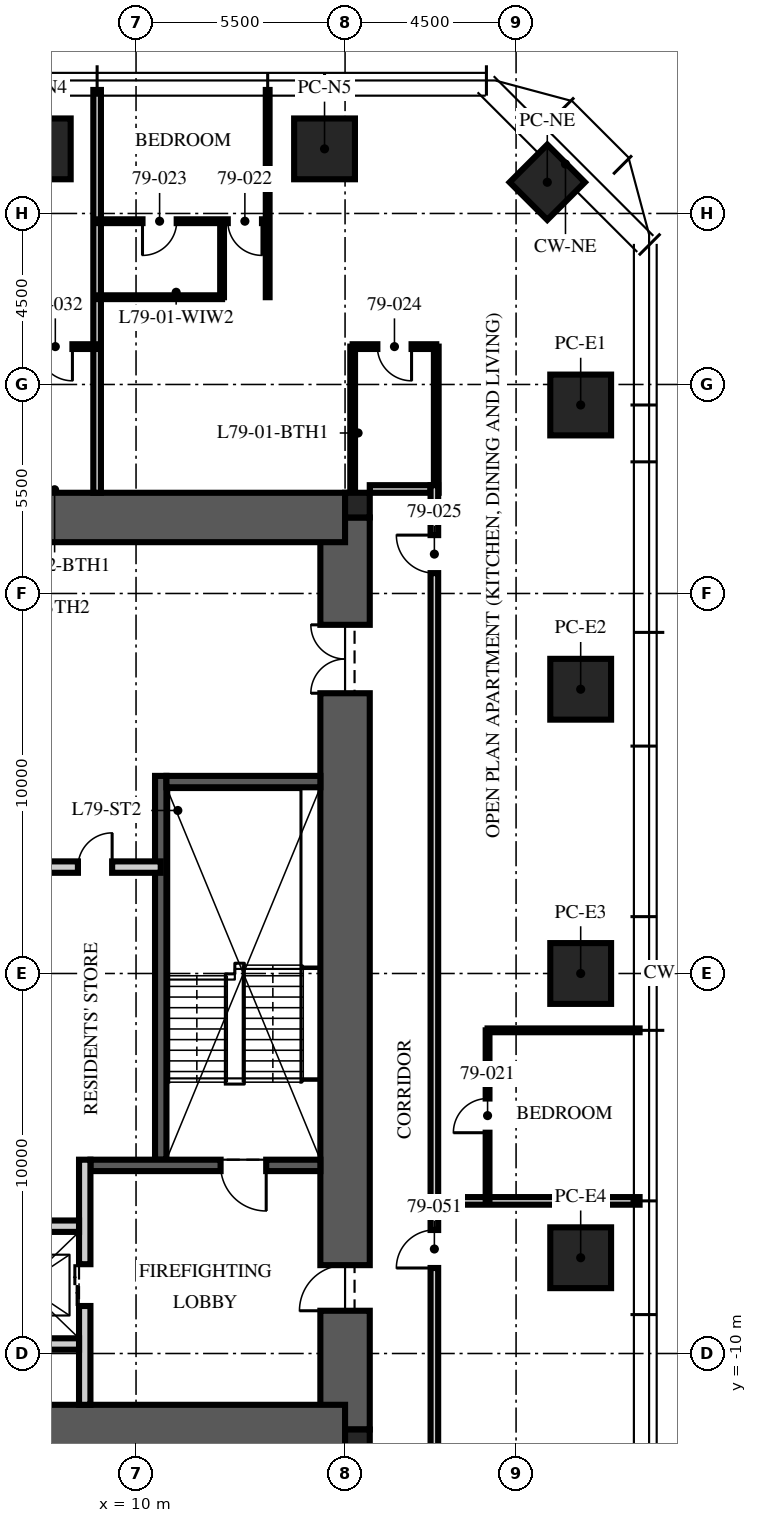
"""IFC4 building model, lengths in metres.
Left out: names, types, materials, properties, quantities, classifications, styles, units other than length and angle.
Written with IfcOpenShell. Run it as: python <this file> out.ifc"""

import sys

from ifc_helpers import new_model, si_unit, direction, frame, frame_2d, origin, origin_2d, place, context, subcontext, project, spatial, rectangle, extrude, element, fill, save


model = new_model("IFC4")
c1 = context("Model", 3, precision=1e-05, world=origin(), true_north=direction((0.0, 1.0)))
c2 = subcontext(c1, "Body", "Model", "MODEL_VIEW")
j1 = project(units=[si_unit("LENGTHUNIT", "METRE"), si_unit("PLANEANGLEUNIT", "RADIAN")], contexts=[c1])
p1 = place(None, origin())
s1 = spatial("IfcSite", under=j1, at=p1, CompositionType="ELEMENT")
p2 = place(p1, origin())
s2 = spatial("IfcBuilding", under=s1, at=p2, CompositionType="ELEMENT")
p3 = place(p2, frame((0.0, 0.0, 315.75)))
s3 = spatial("IfcBuildingStorey", under=s2, at=p3, CompositionType="ELEMENT", Elevation=315.75)
p4 = place(p3, frame((15.5, -12.0, -0.25), z_axis=(0.0, 0.0, 1.0), x_axis=(0.0, 1.0, 0.0)))
e1 = element("IfcWall", 1, at=p4, inside=s3, PredefinedType="SHEAR", context=c2, shape_type="SweptSolid", body=[
    extrude(rectangle(XDim=24.0, YDim=1.3, at=frame_2d((12.0, 0.0))), origin(), (0.0, 0.0, 1.0), 3.75),
])
p5 = place(p4, frame((3.125, 0.0, 0.25)))
e2 = element("IfcOpeningElement", 2, at=p5, cuts=e1, PredefinedType="OPENING", context=c2, shape_type="SweptSolid", body=[
    extrude(rectangle(XDim=1.2, YDim=2.1, at=frame_2d((0.6, 1.05))), frame((0.0, 0.66, 0.0), z_axis=(0.0, -1.0, 0.0), x_axis=(1.0, 0.0, 0.0)), (0.0, 0.0, 1.0), 1.32),
])
p6 = place(p4, frame((19.375, 0.0, 0.25)))
e3 = element("IfcOpeningElement", 3, at=p6, cuts=e1, PredefinedType="OPENING", context=c2, shape_type="SweptSolid", body=[
    extrude(rectangle(XDim=1.8, YDim=2.1, at=frame_2d((0.9, 1.05))), frame((0.0, 0.66, 0.0), z_axis=(0.0, -1.0, 0.0), x_axis=(1.0, 0.0, 0.0)), (0.0, 0.0, 1.0), 1.32),
])
for number, where, z_axis, x_axis in (
    (4, (-15.5, 12.0, -0.25), (0.0, 0.0, 1.0), (1.0, 0.0, 0.0)),
    (5, (-15.5, -12.0, -0.25), (0.0, 0.0, 1.0), (1.0, 0.0, 0.0)),
):
    element("IfcWall", number, at=place(p3, frame(where, z_axis=z_axis, x_axis=x_axis)), inside=s3, PredefinedType="SHEAR", context=c2, shape_type="SweptSolid", body=[
        extrude(rectangle(XDim=31.0, YDim=1.3, at=frame_2d((15.5, 0.0))), origin(), (0.0, 0.0, 1.0), 3.75),
    ])
for number, where, z_axis, x_axis in (
    (6, (15.825, 12.325, -0.25), (0.0, 0.0, 1.0), (1.0, 0.0, 0.0)),
    (7, (15.825, -12.325, -0.25), (0.0, 0.0, 1.0), (1.0, 0.0, 0.0)),
):
    element("IfcColumn", number, at=place(p3, frame(where, z_axis=z_axis, x_axis=x_axis)), inside=s3, PredefinedType="COLUMN", context=c2, shape_type="SweptSolid", body=[
        extrude(rectangle(XDim=0.65, YDim=0.65, at=origin_2d()), origin(), (0.0, 0.0, 1.0), 3.75),
    ])
for number, where, z_axis, x_axis in (
    (8, (7.48, 21.7, 0.0), (0.0, 0.0, 1.0), (1.0, 0.0, 0.0)),
    (9, (14.96, 21.7, 0.0), (0.0, 0.0, 1.0), (1.0, 0.0, 0.0)),
    (10, (21.7, 14.96, 0.0), (0.0, 0.0, 1.0), (0.0, 1.0, 0.0)),
    (11, (21.7, 7.48, 0.0), (0.0, 0.0, 1.0), (0.0, 1.0, 0.0)),
    (12, (21.7, 0.0, 0.0), (0.0, 0.0, 1.0), (0.0, 1.0, 0.0)),
    (13, (21.7, -7.48, 0.0), (0.0, 0.0, 1.0), (0.0, 1.0, 0.0)),
):
    element("IfcColumn", number, at=place(p3, frame(where, z_axis=z_axis, x_axis=x_axis)), inside=s3, PredefinedType="COLUMN", context=c2, shape_type="SweptSolid", body=[
        extrude(rectangle(XDim=1.6, YDim=1.6, at=origin_2d()), origin(), (0.0, 0.0, 1.0), 3.75),
    ])
p7 = place(p3, frame((20.821, 20.821, 0.0), z_axis=(0.0, 0.0, 1.0), x_axis=(0.707106781187, -0.707106781187, 0.0)))
e14 = element("IfcColumn", 14, at=p7, inside=s3, PredefinedType="COLUMN", context=c2, shape_type="SweptSolid", body=[
    extrude(rectangle(XDim=1.4, YDim=1.4, at=origin_2d()), origin(), (0.0, 0.0, 1.0), 3.75),
])
p8 = place(p3, frame((10.65, -4.9, 0.0), z_axis=(0.0, 0.0, 1.0), x_axis=(0.0, 1.0, 0.0)))
e15 = element("IfcWall", 15, at=p8, inside=s3, PredefinedType="SOLIDWALL", context=c2, shape_type="SweptSolid", body=[
    extrude(rectangle(XDim=10.1, YDim=0.3, at=frame_2d((5.05, 0.0))), origin(), (0.0, 0.0, 1.0), 3.5),
])
p9 = place(p3, frame((14.85, -5.05, 0.0), z_axis=(0.0, 0.0, 1.0), x_axis=(-1.0, 0.0, 0.0)))
e16 = element("IfcWall", 16, at=p9, inside=s3, PredefinedType="SOLIDWALL", context=c2, shape_type="SweptSolid", body=[
    extrude(rectangle(XDim=6.05, YDim=0.3, at=frame_2d((3.025, 0.0))), origin(), (0.0, 0.0, 1.0), 3.5),
])
p10 = place(p9, frame((1.425, 0.0, 0.0)))
e17 = element("IfcOpeningElement", 17, at=p10, cuts=e16, PredefinedType="OPENING", context=c2, shape_type="SweptSolid", body=[
    extrude(rectangle(XDim=1.2, YDim=2.1, at=frame_2d((0.6, 1.05))), frame((0.0, 0.16, 0.0), z_axis=(0.0, -1.0, 0.0), x_axis=(1.0, 0.0, 0.0)), (0.0, 0.0, 1.0), 0.32),
])
p11 = place(p3, frame((14.85, 5.05, 0.0), z_axis=(0.0, 0.0, 1.0), x_axis=(-1.0, 0.0, 0.0)))
e18 = element("IfcWall", 18, at=p11, inside=s3, PredefinedType="SOLIDWALL", context=c2, shape_type="SweptSolid", body=[
    extrude(rectangle(XDim=4.05, YDim=0.3, at=frame_2d((2.025, 0.0))), origin(), (0.0, 0.0, 1.0), 3.5),
])
p12 = place(p3, frame((8.65, -11.35, 0.0), z_axis=(0.0, 0.0, 1.0), x_axis=(0.0, 1.0, 0.0)))
e19 = element("IfcWall", 19, at=p12, inside=s3, PredefinedType="PARTITIONING", context=c2, shape_type="SweptSolid", body=[
    extrude(rectangle(XDim=6.45, YDim=0.3, at=frame_2d((3.225, 0.0))), origin(), (0.0, 0.0, 1.0), 3.5),
])
p13 = place(p12, frame((2.6, 0.0, 0.0)))
e20 = element("IfcOpeningElement", 20, at=p13, cuts=e19, PredefinedType="OPENING", context=c2, shape_type="SweptSolid", body=[
    extrude(rectangle(XDim=1.1, YDim=2.1, at=frame_2d((0.55, 1.05))), frame((0.0, 0.16, 0.0), z_axis=(0.0, -1.0, 0.0), x_axis=(1.0, 0.0, 0.0)), (0.0, 0.0, 1.0), 0.32),
])
p14 = place(p3, frame((-8.5, -6.65, 0.0), z_axis=(0.0, 0.0, 1.0), x_axis=(1.0, 0.0, 0.0)))
e21 = element("IfcWall", 21, at=p14, inside=s3, PredefinedType="PARTITIONING", context=c2, shape_type="SweptSolid", body=[
    extrude(rectangle(XDim=17.0, YDim=0.3, at=frame_2d((8.5, 0.0))), origin(), (0.0, 0.0, 1.0), 3.5),
])
p15 = place(p14, frame((7.8, 0.0, 0.0)))
e22 = element("IfcOpeningElement", 22, at=p15, cuts=e21, PredefinedType="OPENING", context=c2, shape_type="SweptSolid", body=[
    extrude(rectangle(XDim=1.3, YDim=2.4, at=frame_2d((0.65, 1.2))), frame((0.0, 0.16, 0.0), z_axis=(0.0, -1.0, 0.0), x_axis=(1.0, 0.0, 0.0)), (0.0, 0.0, 1.0), 0.32),
])
p16 = place(p14, frame((5.65, 0.0, 0.0)))
e23 = element("IfcOpeningElement", 23, at=p16, cuts=e21, PredefinedType="OPENING", context=c2, shape_type="SweptSolid", body=[
    extrude(rectangle(XDim=0.9, YDim=2.1, at=frame_2d((0.45, 1.05))), frame((0.0, 0.16, 0.0), z_axis=(0.0, -1.0, 0.0), x_axis=(1.0, 0.0, 0.0)), (0.0, 0.0, 1.0), 0.32),
])
p17 = place(p14, frame((10.4, 0.0, 0.0)))
e24 = element("IfcOpeningElement", 24, at=p17, cuts=e21, PredefinedType="OPENING", context=c2, shape_type="SweptSolid", body=[
    extrude(rectangle(XDim=0.9, YDim=2.1, at=frame_2d((0.45, 1.05))), frame((0.0, 0.16, 0.0), z_axis=(0.0, -1.0, 0.0), x_axis=(1.0, 0.0, 0.0)), (0.0, 0.0, 1.0), 0.32),
])
p18 = place(p3, frame((5.6, -9.75, 0.0), z_axis=(0.0, 0.0, 1.0), x_axis=(1.0, 0.0, 0.0)))
e25 = element("IfcWall", 25, at=p18, inside=s3, PredefinedType="PARTITIONING", context=c2, shape_type="SweptSolid", body=[
    extrude(rectangle(XDim=2.9, YDim=0.3, at=frame_2d((1.45, 0.0))), origin(), (0.0, 0.0, 1.0), 3.5),
])
p19 = place(p3, frame((-10.65, 2.8, 0.0), z_axis=(0.0, 0.0, 1.0), x_axis=(1.0, 0.0, 0.0)))
e26 = element("IfcWall", 26, at=p19, inside=s3, PredefinedType="PARTITIONING", context=c2, shape_type="SweptSolid", body=[
    extrude(rectangle(XDim=21.3, YDim=0.3, at=frame_2d((10.65, 0.0))), origin(), (0.0, 0.0, 1.0), 3.5),
])
p20 = place(p19, frame((10.05, 0.0, 0.0)))
e27 = element("IfcOpeningElement", 27, at=p20, cuts=e26, PredefinedType="OPENING", context=c2, shape_type="SweptSolid", body=[
    extrude(rectangle(XDim=1.2, YDim=2.1, at=frame_2d((0.6, 1.05))), frame((0.0, 0.16, 0.0), z_axis=(0.0, -1.0, 0.0), x_axis=(1.0, 0.0, 0.0)), (0.0, 0.0, 1.0), 0.32),
])
p21 = place(p19, frame((19.121, 0.0, 0.0)))
e28 = element("IfcOpeningElement", 28, at=p21, cuts=e26, PredefinedType="OPENING", context=c2, shape_type="SweptSolid", body=[
    extrude(rectangle(XDim=0.9, YDim=2.1, at=frame_2d((0.45, 1.05))), frame((0.0, 0.16, 0.0), z_axis=(0.0, -1.0, 0.0), x_axis=(1.0, 0.0, 0.0)), (0.0, 0.0, 1.0), 0.32),
])
p22 = place(p3, frame((16.15, 12.75, 0.0), z_axis=(0.0, 0.0, 1.0), x_axis=(1.0, 0.0, 0.0)))
e29 = element("IfcWall", 29, at=p22, inside=s3, PredefinedType="PARTITIONING", context=c2, shape_type="SweptSolid", body=[
    extrude(rectangle(XDim=1.6, YDim=0.2, at=frame_2d((0.8, 0.0))), origin(), (0.0, 0.0, 1.0), 2.6),
])
p23 = place(p3, frame((17.95, -5.984, 0.0), z_axis=(0.0, 0.0, 1.0), x_axis=(1.0, 0.0, 0.0)))
e30 = element("IfcWall", 30, at=p23, inside=s3, PredefinedType="PARTITIONING", context=c2, shape_type="SweptSolid", body=[
    extrude(rectangle(XDim=5.3, YDim=0.2, at=frame_2d((2.65, 0.0))), origin(), (0.0, 0.0, 1.0), 3.01),
])
p24 = place(p3, frame((19.25, -1.496, 0.0), z_axis=(0.0, 0.0, 1.0), x_axis=(1.0, 0.0, 0.0)))
e31 = element("IfcWall", 31, at=p24, inside=s3, PredefinedType="PARTITIONING", context=c2, shape_type="SweptSolid", body=[
    extrude(rectangle(XDim=4.0, YDim=0.1, at=frame_2d((2.0, 0.0))), origin(), (0.0, 0.0, 1.0), 3.01),
])
p25 = place(p3, frame((13.464, 17.796, 0.0), z_axis=(0.0, 0.0, 1.0), x_axis=(0.0, 1.0, 0.0)))
e32 = element("IfcWall", 32, at=p25, inside=s3, PredefinedType="PARTITIONING", context=c2, shape_type="SweptSolid", body=[
    extrude(rectangle(XDim=5.454, YDim=0.1, at=frame_2d((2.727, 0.0))), origin(), (0.0, 0.0, 1.0), 3.01),
])
p26 = place(p3, frame((8.976, 12.65, 0.0), z_axis=(0.0, 0.0, 1.0), x_axis=(0.0, 1.0, 0.0)))
e33 = element("IfcWall", 33, at=p26, inside=s3, PredefinedType="PARTITIONING", context=c2, shape_type="SweptSolid", body=[
    extrude(rectangle(XDim=10.6, YDim=0.2, at=frame_2d((5.3, 0.0))), origin(), (0.0, 0.0, 1.0), 3.01),
])
p27 = place(p3, frame((19.25, -5.984, 0.0), z_axis=(0.0, 0.0, 1.0), x_axis=(0.0, 1.0, 0.0)))
e34 = element("IfcWall", 34, at=p27, inside=s3, PredefinedType="PARTITIONING", context=c2, shape_type="SweptSolid", body=[
    extrude(rectangle(XDim=4.488, YDim=0.1, at=frame_2d((2.244, 0.0))), origin(), (0.0, 0.0, 1.0), 2.91),
])
p28 = place(p27, frame((1.794, 0.0, 0.0)))
e35 = element("IfcOpeningElement", 35, at=p28, cuts=e34, PredefinedType="OPENING", context=c2, shape_type="SweptSolid", body=[
    extrude(rectangle(XDim=0.9, YDim=2.1, at=frame_2d((0.45, 1.05))), frame((0.0, 0.06, 0.0), z_axis=(0.0, -1.0, 0.0), x_axis=(1.0, 0.0, 0.0)), (0.0, 0.0, 1.0), 0.12),
])
p29 = place(p3, frame((13.464, 19.796, 0.0), z_axis=(0.0, 0.0, 1.0), x_axis=(-1.0, 0.0, 0.0)))
e36 = element("IfcWall", 36, at=p29, inside=s3, PredefinedType="PARTITIONING", context=c2, shape_type="SweptSolid", body=[
    extrude(rectangle(XDim=4.488, YDim=0.1, at=frame_2d((2.244, 0.0))), origin(), (0.0, 0.0, 1.0), 2.91),
])
p30 = place(p29, frame((0.15, 0.0, 0.0)))
e37 = element("IfcOpeningElement", 37, at=p30, cuts=e36, PredefinedType="OPENING", context=c2, shape_type="SweptSolid", body=[
    extrude(rectangle(XDim=0.9, YDim=2.1, at=frame_2d((0.45, 1.05))), frame((0.0, 0.06, 0.0), z_axis=(0.0, -1.0, 0.0), x_axis=(1.0, 0.0, 0.0)), (0.0, 0.0, 1.0), 0.12),
])
p31 = place(p29, frame((2.394, 0.0, 0.0)))
e38 = element("IfcOpeningElement", 38, at=p31, cuts=e36, PredefinedType="OPENING", context=c2, shape_type="SweptSolid", body=[
    extrude(rectangle(XDim=0.9, YDim=2.1, at=frame_2d((0.45, 1.05))), frame((0.0, 0.06, 0.0), z_axis=(0.0, -1.0, 0.0), x_axis=(1.0, 0.0, 0.0)), (0.0, 0.0, 1.0), 0.12),
])
p32 = place(p3, frame((12.264, 17.796, 0.0), z_axis=(0.0, 0.0, 1.0), x_axis=(0.0, 1.0, 0.0)))
e39 = element("IfcWall", 39, at=p32, inside=s3, PredefinedType="PARTITIONING", context=c2, shape_type="SweptSolid", body=[
    extrude(rectangle(XDim=2.0, YDim=0.1, at=frame_2d((1.0, 0.0))), origin(), (0.0, 0.0, 1.0), 3.5),
])
p33 = place(p3, frame((12.264, 17.796, 0.0), z_axis=(0.0, 0.0, 1.0), x_axis=(-1.0, 0.0, 0.0)))
e40 = element("IfcWall", 40, at=p33, inside=s3, PredefinedType="PARTITIONING", context=c2, shape_type="SweptSolid", body=[
    extrude(rectangle(XDim=3.288, YDim=0.1, at=frame_2d((1.644, 0.0))), origin(), (0.0, 0.0, 1.0), 2.91),
])
p34 = place(p3, frame((17.9, 16.496, 0.0), z_axis=(0.0, 0.0, 1.0), x_axis=(-1.0, 0.0, 0.0)))
e41 = element("IfcWall", 41, at=p34, inside=s3, PredefinedType="PARTITIONING", context=c2, shape_type="SweptSolid", body=[
    extrude(rectangle(XDim=2.2, YDim=0.125, at=frame_2d((1.1, 0.0))), origin(), (0.0, 0.0, 1.0), 2.91),
])
p35 = place(p34, frame((0.65, 0.0, 0.0)))
e42 = element("IfcOpeningElement", 42, at=p35, cuts=e41, PredefinedType="OPENING", context=c2, shape_type="SweptSolid", body=[
    extrude(rectangle(XDim=0.9, YDim=2.1, at=frame_2d((0.45, 1.05))), frame((0.0, 0.073, 0.0), z_axis=(0.0, -1.0, 0.0), x_axis=(1.0, 0.0, 0.0)), (0.0, 0.0, 1.0), 0.145),
])
for number, where, z_axis, x_axis in (
    (43, (17.9, 12.65, 0.0), (0.0, 0.0, 1.0), (0.0, 1.0, 0.0)),
    (44, (15.7, 12.65, 0.0), (0.0, 0.0, 1.0), (0.0, 1.0, 0.0)),
):
    element("IfcWall", number, at=place(p3, frame(where, z_axis=z_axis, x_axis=x_axis)), inside=s3, PredefinedType="PARTITIONING", context=c2, shape_type="SweptSolid", body=[
        extrude(rectangle(XDim=3.846, YDim=0.125, at=frame_2d((1.923, 0.0))), origin(), (0.0, 0.0, 1.0), 2.6),
    ])
p36 = place(p3, frame((8.976, 16.496, 0.0), z_axis=(0.0, 0.0, 1.0), x_axis=(-1.0, 0.0, 0.0)))
e45 = element("IfcWall", 45, at=p36, inside=s3, PredefinedType="PARTITIONING", context=c2, shape_type="SweptSolid", body=[
    extrude(rectangle(XDim=7.7, YDim=0.125, at=frame_2d((3.85, 0.0))), origin(), (0.0, 0.0, 1.0), 2.9),
])
p37 = place(p36, frame((0.65, 0.0, 0.0)))
e46 = element("IfcOpeningElement", 46, at=p37, cuts=e45, PredefinedType="OPENING", context=c2, shape_type="SweptSolid", body=[
    extrude(rectangle(XDim=0.9, YDim=2.1, at=frame_2d((0.45, 1.05))), frame((0.0, 0.073, 0.0), z_axis=(0.0, -1.0, 0.0), x_axis=(1.0, 0.0, 0.0)), (0.0, 0.0, 1.0), 0.145),
])
p38 = place(p36, frame((2.85, 0.0, 0.0)))
e47 = element("IfcOpeningElement", 47, at=p38, cuts=e45, PredefinedType="OPENING", context=c2, shape_type="SweptSolid", body=[
    extrude(rectangle(XDim=0.9, YDim=2.1, at=frame_2d((0.45, 1.05))), frame((0.0, 0.073, 0.0), z_axis=(0.0, -1.0, 0.0), x_axis=(1.0, 0.0, 0.0)), (0.0, 0.0, 1.0), 0.145),
])
p39 = place(p36, frame((4.85, 0.0, 0.0)))
e48 = element("IfcOpeningElement", 48, at=p39, cuts=e45, PredefinedType="OPENING", context=c2, shape_type="SweptSolid", body=[
    extrude(rectangle(XDim=0.9, YDim=2.1, at=frame_2d((0.45, 1.05))), frame((0.0, 0.073, 0.0), z_axis=(0.0, -1.0, 0.0), x_axis=(1.0, 0.0, 0.0)), (0.0, 0.0, 1.0), 0.145),
])
p40 = place(p36, frame((6.5, 0.0, 0.0)))
e49 = element("IfcOpeningElement", 49, at=p40, cuts=e45, PredefinedType="OPENING", context=c2, shape_type="SweptSolid", body=[
    extrude(rectangle(XDim=0.9, YDim=2.1, at=frame_2d((0.45, 1.05))), frame((0.0, 0.073, 0.0), z_axis=(0.0, -1.0, 0.0), x_axis=(1.0, 0.0, 0.0)), (0.0, 0.0, 1.0), 0.145),
])
p41 = place(p3, frame((17.85, -12.65, 0.0), z_axis=(0.0, 0.0, 1.0), x_axis=(0.0, 1.0, 0.0)))
e50 = element("IfcWall", 50, at=p41, inside=s3, PredefinedType="PARTITIONING", context=c2, shape_type="SweptSolid", body=[
    extrude(rectangle(XDim=25.5, YDim=0.2, at=frame_2d((12.75, 0.0))), origin(), (0.0, 0.0, 1.0), 2.9),
])
p42 = place(p41, frame((23.186, 0.0, 0.0)))
e51 = element("IfcOpeningElement", 51, at=p42, cuts=e50, PredefinedType="OPENING", context=c2, shape_type="SweptSolid", body=[
    extrude(rectangle(XDim=1.0, YDim=2.2, at=frame_2d((0.5, 1.1))), frame((0.0, 0.11, 0.0), z_axis=(0.0, -1.0, 0.0), x_axis=(1.0, 0.0, 0.0)), (0.0, 0.0, 1.0), 0.22),
])
p43 = place(p41, frame((4.9, 0.0, 0.0)))
e52 = element("IfcOpeningElement", 52, at=p43, cuts=e50, PredefinedType="OPENING", context=c2, shape_type="SweptSolid", body=[
    extrude(rectangle(XDim=1.0, YDim=2.2, at=frame_2d((0.5, 1.1))), frame((0.0, 0.11, 0.0), z_axis=(0.0, -1.0, 0.0), x_axis=(1.0, 0.0, 0.0)), (0.0, 0.0, 1.0), 0.22),
])
p44 = place(p10, origin())
e53 = element("IfcDoor", 53, at=p44, inside=s3, OperationType="SINGLE_SWING_LEFT", PredefinedType="DOOR", context=c2, shape_type="SweptSolid", body=[
    extrude(rectangle(XDim=1.2, YDim=2.1, at=frame_2d((0.6, 1.05))), frame((0.0, 0.025, 0.0), z_axis=(0.0, -1.0, 0.0), x_axis=(1.0, 0.0, 0.0)), (0.0, 0.0, 1.0), 0.05),
])
fill(e17, e53)
p45 = place(p5, origin())
e54 = element("IfcDoor", 54, at=p45, inside=s3, OperationType="SINGLE_SWING_LEFT", PredefinedType="DOOR", context=c2, shape_type="SweptSolid", body=[
    extrude(rectangle(XDim=1.2, YDim=2.1, at=frame_2d((0.6, 1.05))), frame((0.0, 0.025, 0.0), z_axis=(0.0, -1.0, 0.0), x_axis=(1.0, 0.0, 0.0)), (0.0, 0.0, 1.0), 0.05),
])
fill(e2, e54)
p46 = place(p6, origin())
e55 = element("IfcDoor", 55, at=p46, inside=s3, OperationType="DOUBLE_DOOR_SINGLE_SWING", PredefinedType="DOOR", context=c2, shape_type="SweptSolid", body=[
    extrude(rectangle(XDim=1.8, YDim=2.1, at=frame_2d((0.9, 1.05))), frame((0.0, 0.025, 0.0), z_axis=(0.0, -1.0, 0.0), x_axis=(1.0, 0.0, 0.0)), (0.0, 0.0, 1.0), 0.05),
])
fill(e3, e55)
p47 = place(p13, origin())
e56 = element("IfcDoor", 56, at=p47, inside=s3, OperationType="DOUBLE_DOOR_SLIDING", PredefinedType="DOOR", context=c2, shape_type="SweptSolid", body=[
    extrude(rectangle(XDim=1.1, YDim=2.1, at=frame_2d((0.55, 1.05))), frame((0.0, 0.025, 0.0), z_axis=(0.0, -1.0, 0.0), x_axis=(1.0, 0.0, 0.0)), (0.0, 0.0, 1.0), 0.05),
])
fill(e20, e56)
p48 = place(p21, origin())
e57 = element("IfcDoor", 57, at=p48, inside=s3, OperationType="SINGLE_SWING_RIGHT", PredefinedType="DOOR", context=c2, shape_type="SweptSolid", body=[
    extrude(rectangle(XDim=0.9, YDim=2.1, at=frame_2d((0.45, 1.05))), frame((0.0, 0.025, 0.0), z_axis=(0.0, -1.0, 0.0), x_axis=(1.0, 0.0, 0.0)), (0.0, 0.0, 1.0), 0.05),
])
fill(e28, e57)
p49 = place(p28, origin())
e58 = element("IfcDoor", 58, at=p49, inside=s3, OperationType="SINGLE_SWING_LEFT", PredefinedType="DOOR", context=c2, shape_type="SweptSolid", body=[
    extrude(rectangle(XDim=0.9, YDim=2.1, at=frame_2d((0.45, 1.05))), frame((0.0, 0.025, 0.0), z_axis=(0.0, -1.0, 0.0), x_axis=(1.0, 0.0, 0.0)), (0.0, 0.0, 1.0), 0.05),
])
fill(e35, e58)
p50 = place(p30, origin())
e59 = element("IfcDoor", 59, at=p50, inside=s3, OperationType="SINGLE_SWING_LEFT", PredefinedType="DOOR", context=c2, shape_type="SweptSolid", body=[
    extrude(rectangle(XDim=0.9, YDim=2.1, at=frame_2d((0.45, 1.05))), frame((0.0, 0.025, 0.0), z_axis=(0.0, -1.0, 0.0), x_axis=(1.0, 0.0, 0.0)), (0.0, 0.0, 1.0), 0.05),
])
fill(e37, e59)
p51 = place(p31, origin())
e60 = element("IfcDoor", 60, at=p51, inside=s3, OperationType="SINGLE_SWING_RIGHT", PredefinedType="DOOR", context=c2, shape_type="SweptSolid", body=[
    extrude(rectangle(XDim=0.9, YDim=2.1, at=frame_2d((0.45, 1.05))), frame((0.0, 0.025, 0.0), z_axis=(0.0, -1.0, 0.0), x_axis=(1.0, 0.0, 0.0)), (0.0, 0.0, 1.0), 0.05),
])
fill(e38, e60)
p52 = place(p35, origin())
e61 = element("IfcDoor", 61, at=p52, inside=s3, OperationType="SINGLE_SWING_LEFT", PredefinedType="DOOR", context=c2, shape_type="SweptSolid", body=[
    extrude(rectangle(XDim=0.9, YDim=2.1, at=frame_2d((0.45, 1.05))), frame((0.0, 0.025, 0.0), z_axis=(0.0, -1.0, 0.0), x_axis=(1.0, 0.0, 0.0)), (0.0, 0.0, 1.0), 0.05),
])
fill(e42, e61)
p53 = place(p42, origin())
e62 = element("IfcDoor", 62, at=p53, inside=s3, OperationType="SINGLE_SWING_RIGHT", PredefinedType="DOOR", context=c2, shape_type="SweptSolid", body=[
    extrude(rectangle(XDim=1.0, YDim=2.2, at=frame_2d((0.5, 1.1))), frame((0.0, 0.025, 0.0), z_axis=(0.0, -1.0, 0.0), x_axis=(1.0, 0.0, 0.0)), (0.0, 0.0, 1.0), 0.05),
])
fill(e51, e62)
p54 = place(p37, origin())
e63 = element("IfcDoor", 63, at=p54, inside=s3, OperationType="SINGLE_SWING_LEFT", PredefinedType="DOOR", context=c2, shape_type="SweptSolid", body=[
    extrude(rectangle(XDim=0.9, YDim=2.1, at=frame_2d((0.45, 1.05))), frame((0.0, 0.025, 0.0), z_axis=(0.0, -1.0, 0.0), x_axis=(1.0, 0.0, 0.0)), (0.0, 0.0, 1.0), 0.05),
])
fill(e46, e63)
p55 = place(p43, origin())
e64 = element("IfcDoor", 64, at=p55, inside=s3, OperationType="SINGLE_SWING_LEFT", PredefinedType="DOOR", context=c2, shape_type="SweptSolid", body=[
    extrude(rectangle(XDim=1.0, YDim=2.2, at=frame_2d((0.5, 1.1))), frame((0.0, 0.025, 0.0), z_axis=(0.0, -1.0, 0.0), x_axis=(1.0, 0.0, 0.0)), (0.0, 0.0, 1.0), 0.05),
])
fill(e52, e64)
save(model, sys.argv[1])
